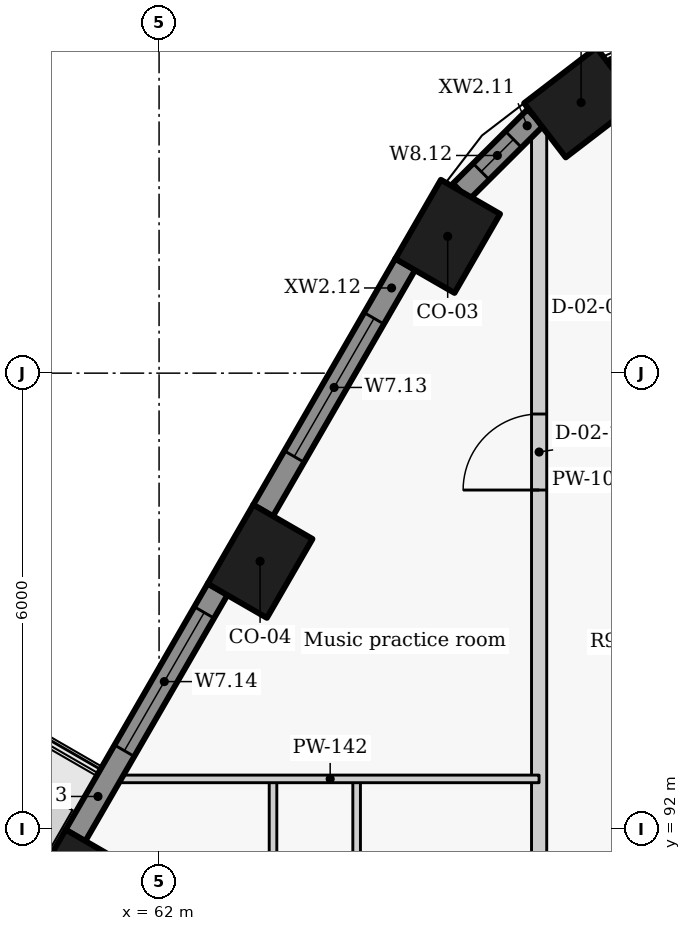
"""IFC4 building model, lengths in metres.
Left out: names, types, materials, properties, quantities, classifications, styles, units other than length and angle.
Written with IfcOpenShell. Run it as: python <this file> out.ifc"""

import sys

from ifc_helpers import new_model, si_unit, direction, frame, frame_2d, origin, origin_2d, place, context, subcontext, project, spatial, rectangle, extrude, element, fill, save


model = new_model("IFC4")
c1 = context("Model", 3, precision=1e-05, world=origin(), true_north=direction((0.0, 1.0)))
c2 = subcontext(c1, "Body", "Model", "MODEL_VIEW")
j1 = project(units=[si_unit("LENGTHUNIT", "METRE"), si_unit("PLANEANGLEUNIT", "RADIAN")], contexts=[c1])
p1 = place(None, origin())
s1 = spatial("IfcSite", under=j1, at=p1, CompositionType="ELEMENT")
p2 = place(p1, origin())
s2 = spatial("IfcBuilding", under=s1, at=p2, CompositionType="ELEMENT")
p3 = place(p2, frame((0.0, 0.0, 203.1)))
s3 = spatial("IfcBuildingStorey", under=s2, at=p3, CompositionType="ELEMENT", Elevation=203.1)
for number, where, z_axis, x_axis in (
    (1, (67.552, 101.56, 0.0), (0.0, 0.0, 1.0), (-0.793, -0.609, 0.0)),
    (2, (65.797, 99.8, 0.0), (0.0, 0.0, 1.0), (-0.5, -0.866, 0.0)),
    (3, (63.329, 95.525, 0.0), (0.0, 0.0, 1.0), (-0.5, -0.866, 0.0)),
    (4, (60.861, 91.25, 0.0), (0.0, 0.0, 1.0), (-0.5, -0.866, 0.0)),
):
    element("IfcColumn", number, at=place(p3, frame(where, z_axis=z_axis, x_axis=x_axis)), inside=s3, PredefinedType="COLUMN", context=c2, shape_type="SweptSolid", body=[
        extrude(rectangle(XDim=1.2, YDim=0.9, at=origin_2d()), origin(), (0.0, 0.0, 1.0), 3.3),
    ])
p4 = place(p3, frame((69.336, 102.333, 0.0), z_axis=(0.0, 0.0, 1.0), x_axis=(-0.969037396898, -0.246914000036, 0.0)))
e5 = element("IfcWall", 5, at=p4, inside=s3, PredefinedType="SOLIDWALL", context=c2, shape_type="SweptSolid", body=[
    extrude(rectangle(XDim=1.403, YDim=0.3, at=frame_2d((0.702, 0.0))), origin(), (0.0, 0.0, 1.0), 2.425),
])
p5 = place(p4, frame((0.229, 0.0, 0.9)))
e6 = element("IfcOpeningElement", 6, at=p5, cuts=e5, PredefinedType="OPENING", context=c2, shape_type="SweptSolid", body=[
    extrude(rectangle(XDim=0.6, YDim=1.1, at=frame_2d((0.3, 0.55))), frame((0.0, 0.16, 0.0), z_axis=(0.0, -1.0, 0.0), x_axis=(1.0, 0.0, 0.0)), (0.0, 0.0, 1.0), 0.32),
])
p6 = place(p3, frame((66.952, 101.363, 0.0), z_axis=(0.0, 0.0, 1.0), x_axis=(-0.70869320446, -0.705516790695, 0.0)))
e7 = element("IfcWall", 7, at=p6, inside=s3, PredefinedType="SOLIDWALL", context=c2, shape_type="SweptSolid", body=[
    extrude(rectangle(XDim=1.384, YDim=0.3, at=frame_2d((0.692, 0.0))), origin(), (0.0, 0.0, 1.0), 2.425),
])
p7 = place(p6, frame((0.408, 0.0, 0.9)))
e8 = element("IfcOpeningElement", 8, at=p7, cuts=e7, PredefinedType="OPENING", context=c2, shape_type="SweptSolid", body=[
    extrude(rectangle(XDim=0.6, YDim=1.1, at=frame_2d((0.3, 0.55))), frame((0.0, 0.16, 0.0), z_axis=(0.0, -1.0, 0.0), x_axis=(1.0, 0.0, 0.0)), (0.0, 0.0, 1.0), 0.32),
])
p8 = place(p3, frame((65.239, 99.433, 0.0), z_axis=(0.0, 0.0, 1.0), x_axis=(-0.499982088007, -0.866035745032, 0.0)))
e9 = element("IfcWall", 9, at=p8, inside=s3, PredefinedType="SOLIDWALL", context=c2, shape_type="SweptSolid", body=[
    extrude(rectangle(XDim=3.744, YDim=0.3, at=frame_2d((1.872, 0.0))), origin(), (0.0, 0.0, 1.0), 2.425),
])
p9 = place(p8, frame((0.822, 0.0, 0.9)))
e10 = element("IfcOpeningElement", 10, at=p9, cuts=e9, PredefinedType="OPENING", context=c2, shape_type="SweptSolid", body=[
    extrude(rectangle(XDim=2.1, YDim=1.1, at=frame_2d((1.05, 0.55))), frame((0.0, 0.16, 0.0), z_axis=(0.0, -1.0, 0.0), x_axis=(1.0, 0.0, 0.0)), (0.0, 0.0, 1.0), 0.32),
])
p10 = place(p3, frame((62.771, 95.158, 0.0), z_axis=(0.0, 0.0, 1.0), x_axis=(-0.500059225181, -0.86599120741, 0.0)))
e11 = element("IfcWall", 11, at=p10, inside=s3, PredefinedType="SOLIDWALL", context=c2, shape_type="SweptSolid", body=[
    extrude(rectangle(XDim=3.744, YDim=0.3, at=frame_2d((1.872, 0.0))), origin(), (0.0, 0.0, 1.0), 2.425),
])
p11 = place(p10, frame((0.354, 0.0, 0.9)))
e12 = element("IfcOpeningElement", 12, at=p11, cuts=e11, PredefinedType="OPENING", context=c2, shape_type="SweptSolid", body=[
    extrude(rectangle(XDim=2.1, YDim=1.1, at=frame_2d((1.05, 0.55))), frame((0.0, 0.16, 0.0), z_axis=(0.0, -1.0, 0.0), x_axis=(1.0, 0.0, 0.0)), (0.0, 0.0, 1.0), 0.32),
])
p12 = place(p3, frame((67.0, 58.674, 0.0), z_axis=(0.0, 0.0, 1.0), x_axis=(0.0, 1.0, 0.0)))
e13 = element("IfcWall", 13, at=p12, inside=s3, PredefinedType="PARTITIONING", context=c2, shape_type="SweptSolid", body=[
    extrude(rectangle(XDim=42.592, YDim=0.2, at=frame_2d((21.296, 0.0))), origin(), (0.0, 0.0, 1.0), 2.405),
])
p13 = place(p12, frame((2.376, 0.0, 0.0)))
e14 = element("IfcOpeningElement", 14, at=p13, cuts=e13, PredefinedType="OPENING", context=c2, shape_type="SweptSolid", body=[
    extrude(rectangle(XDim=1.0, YDim=2.1, at=frame_2d((0.5, 1.05))), frame((0.0, 0.11, 0.0), z_axis=(0.0, -1.0, 0.0), x_axis=(1.0, 0.0, 0.0)), (0.0, 0.0, 1.0), 0.22),
])
p14 = place(p12, frame((11.126, 0.0, 0.0)))
e15 = element("IfcOpeningElement", 15, at=p14, cuts=e13, PredefinedType="OPENING", context=c2, shape_type="SweptSolid", body=[
    extrude(rectangle(XDim=1.0, YDim=2.1, at=frame_2d((0.5, 1.05))), frame((0.0, 0.11, 0.0), z_axis=(0.0, -1.0, 0.0), x_axis=(1.0, 0.0, 0.0)), (0.0, 0.0, 1.0), 0.22),
])
p15 = place(p12, frame((25.626, 0.0, 0.0)))
e16 = element("IfcOpeningElement", 16, at=p15, cuts=e13, PredefinedType="OPENING", context=c2, shape_type="SweptSolid", body=[
    extrude(rectangle(XDim=1.0, YDim=2.1, at=frame_2d((0.5, 1.05))), frame((0.0, 0.11, 0.0), z_axis=(0.0, -1.0, 0.0), x_axis=(1.0, 0.0, 0.0)), (0.0, 0.0, 1.0), 0.22),
])
p16 = place(p12, frame((21.2, 0.0, 0.0)))
e17 = element("IfcOpeningElement", 17, at=p16, cuts=e13, PredefinedType="OPENING", context=c2, shape_type="SweptSolid", body=[
    extrude(rectangle(XDim=1.0, YDim=2.1, at=frame_2d((0.5, 1.05))), frame((0.0, 0.11, 0.0), z_axis=(0.0, -1.0, 0.0), x_axis=(1.0, 0.0, 0.0)), (0.0, 0.0, 1.0), 0.22),
])
p17 = place(p12, frame((37.788, 0.0, 0.0)))
e18 = element("IfcOpeningElement", 18, at=p17, cuts=e13, PredefinedType="OPENING", context=c2, shape_type="SweptSolid", body=[
    extrude(rectangle(XDim=1.0, YDim=2.1, at=frame_2d((0.5, 1.05))), frame((0.0, 0.11, 0.0), z_axis=(0.0, -1.0, 0.0), x_axis=(1.0, 0.0, 0.0)), (0.0, 0.0, 1.0), 0.22),
])
p18 = place(p3, frame((64.599, 92.663, 0.0), z_axis=(0.0, 0.0, 1.0), x_axis=(0.0, -1.0, 0.0)))
e19 = element("IfcWall", 19, at=p18, inside=s3, PredefinedType="PARTITIONING", context=c2, shape_type="SweptSolid", body=[
    extrude(rectangle(XDim=7.062, YDim=0.1, at=frame_2d((3.531, 0.0))), origin(), (0.0, 0.0, 1.0), 3.025),
])
p19 = place(p18, frame((5.033, 0.0, 0.0)))
e20 = element("IfcOpeningElement", 20, at=p19, cuts=e19, PredefinedType="OPENING", context=c2, shape_type="SweptSolid", body=[
    extrude(rectangle(XDim=0.85, YDim=2.1, at=frame_2d((0.425, 1.05))), frame((0.0, 0.06, 0.0), z_axis=(0.0, -1.0, 0.0), x_axis=(1.0, 0.0, 0.0)), (0.0, 0.0, 1.0), 0.12),
])
p20 = place(p18, frame((1.477, 0.0, 0.0)))
e21 = element("IfcOpeningElement", 21, at=p20, cuts=e19, PredefinedType="OPENING", context=c2, shape_type="SweptSolid", body=[
    extrude(rectangle(XDim=0.9, YDim=2.1, at=frame_2d((0.45, 1.05))), frame((0.0, 0.06, 0.0), z_axis=(0.0, -1.0, 0.0), x_axis=(1.0, 0.0, 0.0)), (0.0, 0.0, 1.0), 0.12),
])
p21 = place(p3, frame((63.499, 84.0, 0.0), z_axis=(0.0, 0.0, 1.0), x_axis=(0.0, 1.0, 0.0)))
e22 = element("IfcWall", 22, at=p21, inside=s3, PredefinedType="PARTITIONING", context=c2, shape_type="SweptSolid", body=[
    extrude(rectangle(XDim=8.663, YDim=0.1, at=frame_2d((4.331, 0.0))), origin(), (0.0, 0.0, 1.0), 3.025),
])
p22 = place(p21, frame((3.881, 0.0, 0.0)))
e23 = element("IfcOpeningElement", 23, at=p22, cuts=e22, PredefinedType="OPENING", context=c2, shape_type="SweptSolid", body=[
    extrude(rectangle(XDim=0.9, YDim=2.1, at=frame_2d((0.45, 1.05))), frame((0.0, 0.06, 0.0), z_axis=(0.0, -1.0, 0.0), x_axis=(1.0, 0.0, 0.0)), (0.0, 0.0, 1.0), 0.12),
])
p23 = place(p3, frame((61.503, 92.662, 0.0), z_axis=(0.0, 0.0, 1.0), x_axis=(1.0, 0.0, 0.0)))
e24 = element("IfcWall", 24, at=p23, inside=s3, PredefinedType="PARTITIONING", context=c2, shape_type="SweptSolid", body=[
    extrude(rectangle(XDim=5.496, YDim=0.1, at=frame_2d((2.748, 0.0))), origin(), (0.0, 0.0, 1.0), 2.405),
])
p24 = place(p7, origin())
e25 = element("IfcWindow", 25, at=p24, inside=s3, PartitioningType="SINGLE_PANEL", PredefinedType="WINDOW", context=c2, shape_type="SweptSolid", body=[
    extrude(rectangle(XDim=0.6, YDim=1.1, at=frame_2d((0.3, 0.55))), frame((0.0, 0.03, 0.0), z_axis=(0.0, -1.0, 0.0), x_axis=(1.0, 0.0, 0.0)), (0.0, 0.0, 1.0), 0.06),
])
fill(e8, e25)
p25 = place(p9, origin())
e26 = element("IfcWindow", 26, at=p25, inside=s3, PartitioningType="SINGLE_PANEL", PredefinedType="WINDOW", context=c2, shape_type="SweptSolid", body=[
    extrude(rectangle(XDim=2.1, YDim=1.1, at=frame_2d((1.05, 0.55))), frame((0.0, 0.03, 0.0), z_axis=(0.0, -1.0, 0.0), x_axis=(1.0, 0.0, 0.0)), (0.0, 0.0, 1.0), 0.06),
])
fill(e10, e26)
p26 = place(p11, origin())
e27 = element("IfcWindow", 27, at=p26, inside=s3, PartitioningType="SINGLE_PANEL", PredefinedType="WINDOW", context=c2, shape_type="SweptSolid", body=[
    extrude(rectangle(XDim=2.1, YDim=1.1, at=frame_2d((1.05, 0.55))), frame((0.0, 0.03, 0.0), z_axis=(0.0, -1.0, 0.0), x_axis=(1.0, 0.0, 0.0)), (0.0, 0.0, 1.0), 0.06),
])
fill(e12, e27)
p27 = place(p17, origin())
e28 = element("IfcDoor", 28, at=p27, inside=s3, OperationType="SINGLE_SWING_LEFT", PredefinedType="DOOR", context=c2, shape_type="SweptSolid", body=[
    extrude(rectangle(XDim=1.0, YDim=2.1, at=frame_2d((0.5, 1.05))), frame((0.0, 0.025, 0.0), z_axis=(0.0, -1.0, 0.0), x_axis=(1.0, 0.0, 0.0)), (0.0, 0.0, 1.0), 0.05),
])
fill(e18, e28)
save(model, sys.argv[1])
